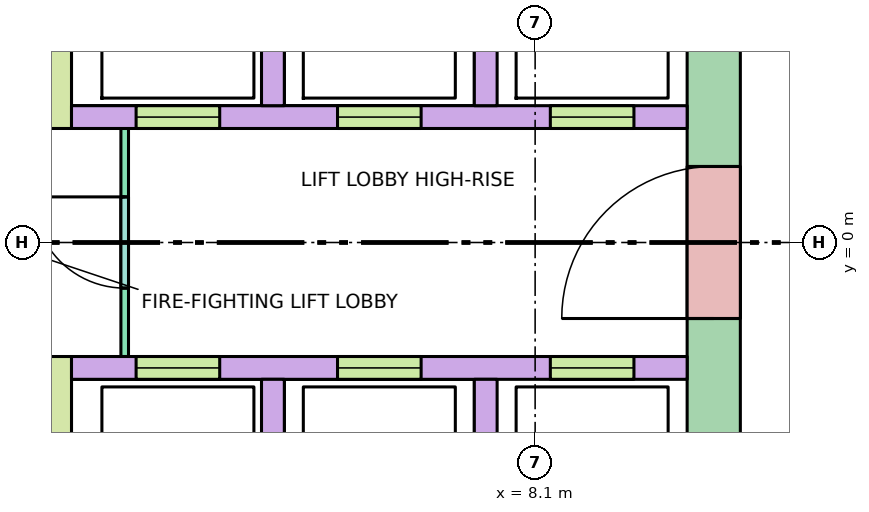
"""IFC4 building model, lengths in metres.
Left out: names, types, materials, properties, quantities, classifications, styles, units other than length and angle.
Written with IfcOpenShell. Run it as: python <this file> out.ifc"""

import sys

from ifc_helpers import new_model, si_unit, direction, frame, frame_2d, origin, place, context, subcontext, project, spatial, rectangle, extrude, element, fill, save


model = new_model("IFC4")
c1 = context("Model", 3, precision=1e-05, world=origin(), true_north=direction((0.0, 1.0)))
c2 = subcontext(c1, "Body", "Model", "MODEL_VIEW")
j1 = project(units=[si_unit("LENGTHUNIT", "METRE"), si_unit("PLANEANGLEUNIT", "RADIAN")], contexts=[c1])
p1 = place(None, origin())
s1 = spatial("IfcSite", under=j1, at=p1, CompositionType="ELEMENT")
p2 = place(p1, origin())
s2 = spatial("IfcBuilding", under=s1, at=p2, CompositionType="ELEMENT")
p3 = place(p2, frame((0.0, 0.0, 226.1)))
s3 = spatial("IfcBuildingStorey", under=s2, at=p3, CompositionType="ELEMENT", Elevation=226.1)
p4 = place(p3, frame((10.45, -5.13, -0.28), z_axis=(0.0, 0.0, 1.0), x_axis=(0.0, 1.0, 0.0)))
e1 = element("IfcWall", 1, at=p4, inside=s3, PredefinedType="SHEAR", context=c2, shape_type="SweptSolid", body=[
    extrude(rectangle(XDim=10.26, YDim=0.7, at=frame_2d((5.13, 0.0))), origin(), (0.0, 0.0, 1.0), 3.7),
])
p5 = place(p4, frame((4.13, 0.0, 0.28)))
e2 = element("IfcOpeningElement", 2, at=p5, cuts=e1, PredefinedType="OPENING", context=c2, shape_type="SweptSolid", body=[
    extrude(rectangle(XDim=2.0, YDim=2.1, at=frame_2d((1.0, 1.05))), frame((0.0, 0.36, 0.0), z_axis=(0.0, -1.0, 0.0), x_axis=(1.0, 0.0, 0.0)), (0.0, 0.0, 1.0), 0.72),
])
p6 = place(p3, frame((2.0, 1.65, 0.0), z_axis=(0.0, 0.0, 1.0), x_axis=(1.0, 0.0, 0.0)))
e3 = element("IfcWall", 3, at=p6, inside=s3, PredefinedType="SOLIDWALL", context=c2, shape_type="SweptSolid", body=[
    extrude(rectangle(XDim=8.1, YDim=0.3, at=frame_2d((4.05, 0.0))), origin(), (0.0, 0.0, 1.0), 3.42),
])
p7 = place(p6, frame((0.85, 0.0, 0.0)))
e4 = element("IfcOpeningElement", 4, at=p7, cuts=e3, PredefinedType="OPENING", context=c2, shape_type="SweptSolid", body=[
    extrude(rectangle(XDim=1.1, YDim=2.1, at=frame_2d((0.55, 1.05))), frame((0.0, 0.16, 0.0), z_axis=(0.0, -1.0, 0.0), x_axis=(1.0, 0.0, 0.0)), (0.0, 0.0, 1.0), 0.32),
])
p8 = place(p6, frame((3.5, 0.0, 0.0)))
e5 = element("IfcOpeningElement", 5, at=p8, cuts=e3, PredefinedType="OPENING", context=c2, shape_type="SweptSolid", body=[
    extrude(rectangle(XDim=1.1, YDim=2.1, at=frame_2d((0.55, 1.05))), frame((0.0, 0.16, 0.0), z_axis=(0.0, -1.0, 0.0), x_axis=(1.0, 0.0, 0.0)), (0.0, 0.0, 1.0), 0.32),
])
p9 = place(p6, frame((6.3, 0.0, 0.0)))
e6 = element("IfcOpeningElement", 6, at=p9, cuts=e3, PredefinedType="OPENING", context=c2, shape_type="SweptSolid", body=[
    extrude(rectangle(XDim=1.1, YDim=2.1, at=frame_2d((0.55, 1.05))), frame((0.0, 0.16, 0.0), z_axis=(0.0, -1.0, 0.0), x_axis=(1.0, 0.0, 0.0)), (0.0, 0.0, 1.0), 0.32),
])
p10 = place(p3, frame((2.0, -1.65, 0.0), z_axis=(0.0, 0.0, 1.0), x_axis=(1.0, 0.0, 0.0)))
e7 = element("IfcWall", 7, at=p10, inside=s3, PredefinedType="SOLIDWALL", context=c2, shape_type="SweptSolid", body=[
    extrude(rectangle(XDim=8.1, YDim=0.3, at=frame_2d((4.05, 0.0))), origin(), (0.0, 0.0, 1.0), 3.42),
])
p11 = place(p10, frame((0.85, 0.0, 0.0)))
e8 = element("IfcOpeningElement", 8, at=p11, cuts=e7, PredefinedType="OPENING", context=c2, shape_type="SweptSolid", body=[
    extrude(rectangle(XDim=1.1, YDim=2.1, at=frame_2d((0.55, 1.05))), frame((0.0, 0.16, 0.0), z_axis=(0.0, -1.0, 0.0), x_axis=(1.0, 0.0, 0.0)), (0.0, 0.0, 1.0), 0.32),
])
p12 = place(p10, frame((3.5, 0.0, 0.0)))
e9 = element("IfcOpeningElement", 9, at=p12, cuts=e7, PredefinedType="OPENING", context=c2, shape_type="SweptSolid", body=[
    extrude(rectangle(XDim=1.1, YDim=2.1, at=frame_2d((0.55, 1.05))), frame((0.0, 0.16, 0.0), z_axis=(0.0, -1.0, 0.0), x_axis=(1.0, 0.0, 0.0)), (0.0, 0.0, 1.0), 0.32),
])
p13 = place(p10, frame((6.3, 0.0, 0.0)))
e10 = element("IfcOpeningElement", 10, at=p13, cuts=e7, PredefinedType="OPENING", context=c2, shape_type="SweptSolid", body=[
    extrude(rectangle(XDim=1.1, YDim=2.1, at=frame_2d((0.55, 1.05))), frame((0.0, 0.16, 0.0), z_axis=(0.0, -1.0, 0.0), x_axis=(1.0, 0.0, 0.0)), (0.0, 0.0, 1.0), 0.32),
])
for number, where, z_axis, x_axis in (
    (11, (4.65, 1.8, 0.0), (0.0, 0.0, 1.0), (0.0, 1.0, 0.0)),
    (12, (4.65, -4.2, 0.0), (0.0, 0.0, 1.0), (0.0, 1.0, 0.0)),
    (13, (7.45, 1.8, 0.0), (0.0, 0.0, 1.0), (0.0, 1.0, 0.0)),
    (14, (7.45, -4.2, 0.0), (0.0, 0.0, 1.0), (0.0, 1.0, 0.0)),
):
    element("IfcWall", number, at=place(p3, frame(where, z_axis=z_axis, x_axis=x_axis)), inside=s3, PredefinedType="SOLIDWALL", context=c2, shape_type="SweptSolid", body=[
        extrude(rectangle(XDim=2.4, YDim=0.3, at=frame_2d((1.2, 0.0))), origin(), (0.0, 0.0, 1.0), 3.42),
    ])
for number, where, z_axis, x_axis in (
    (15, (1.85, 1.5, 0.0), (0.0, 0.0, 1.0), (0.0, 1.0, 0.0)),
    (16, (1.85, -8.1, 0.0), (0.0, 0.0, 1.0), (0.0, 1.0, 0.0)),
):
    element("IfcWall", number, at=place(p3, frame(where, z_axis=z_axis, x_axis=x_axis)), inside=s3, PredefinedType="SHEAR", context=c2, shape_type="SweptSolid", body=[
        extrude(rectangle(XDim=6.6, YDim=0.3, at=frame_2d((3.3, 0.0))), origin(), (0.0, 0.0, 1.0), 3.42),
    ])
p14 = place(p3, frame((2.7, -1.5, 0.0), z_axis=(0.0, 0.0, 1.0), x_axis=(0.0, 1.0, 0.0)))
e17 = element("IfcWall", 17, at=p14, inside=s3, PredefinedType="PARTITIONING", context=c2, shape_type="SweptSolid", body=[
    extrude(rectangle(XDim=3.0, YDim=0.1, at=frame_2d((1.5, 0.0))), origin(), (0.0, 0.0, 1.0), 3.42),
])
p15 = place(p14, frame((0.9, 0.0, 0.0)))
e18 = element("IfcOpeningElement", 18, at=p15, cuts=e17, PredefinedType="OPENING", context=c2, shape_type="SweptSolid", body=[
    extrude(rectangle(XDim=1.2, YDim=2.1, at=frame_2d((0.6, 1.05))), frame((0.0, 0.06, 0.0), z_axis=(0.0, -1.0, 0.0), x_axis=(1.0, 0.0, 0.0)), (0.0, 0.0, 1.0), 0.12),
])
p16 = place(p7, origin())
e19 = element("IfcDoor", 19, at=p16, inside=s3, OperationType="DOUBLE_DOOR_SLIDING", PredefinedType="DOOR", context=c2, shape_type="SweptSolid", body=[
    extrude(rectangle(XDim=1.1, YDim=2.1, at=frame_2d((0.55, 1.05))), frame((0.0, 0.025, 0.0), z_axis=(0.0, -1.0, 0.0), x_axis=(1.0, 0.0, 0.0)), (0.0, 0.0, 1.0), 0.05),
])
fill(e4, e19)
p17 = place(p8, origin())
e20 = element("IfcDoor", 20, at=p17, inside=s3, OperationType="DOUBLE_DOOR_SLIDING", PredefinedType="DOOR", context=c2, shape_type="SweptSolid", body=[
    extrude(rectangle(XDim=1.1, YDim=2.1, at=frame_2d((0.55, 1.05))), frame((0.0, 0.025, 0.0), z_axis=(0.0, -1.0, 0.0), x_axis=(1.0, 0.0, 0.0)), (0.0, 0.0, 1.0), 0.05),
])
fill(e5, e20)
p18 = place(p9, origin())
e21 = element("IfcDoor", 21, at=p18, inside=s3, OperationType="DOUBLE_DOOR_SLIDING", PredefinedType="DOOR", context=c2, shape_type="SweptSolid", body=[
    extrude(rectangle(XDim=1.1, YDim=2.1, at=frame_2d((0.55, 1.05))), frame((0.0, 0.025, 0.0), z_axis=(0.0, -1.0, 0.0), x_axis=(1.0, 0.0, 0.0)), (0.0, 0.0, 1.0), 0.05),
])
fill(e6, e21)
p19 = place(p11, origin())
e22 = element("IfcDoor", 22, at=p19, inside=s3, OperationType="DOUBLE_DOOR_SLIDING", PredefinedType="DOOR", context=c2, shape_type="SweptSolid", body=[
    extrude(rectangle(XDim=1.1, YDim=2.1, at=frame_2d((0.55, 1.05))), frame((0.0, 0.025, 0.0), z_axis=(0.0, -1.0, 0.0), x_axis=(1.0, 0.0, 0.0)), (0.0, 0.0, 1.0), 0.05),
])
fill(e8, e22)
p20 = place(p12, origin())
e23 = element("IfcDoor", 23, at=p20, inside=s3, OperationType="DOUBLE_DOOR_SLIDING", PredefinedType="DOOR", context=c2, shape_type="SweptSolid", body=[
    extrude(rectangle(XDim=1.1, YDim=2.1, at=frame_2d((0.55, 1.05))), frame((0.0, 0.025, 0.0), z_axis=(0.0, -1.0, 0.0), x_axis=(1.0, 0.0, 0.0)), (0.0, 0.0, 1.0), 0.05),
])
fill(e9, e23)
p21 = place(p13, origin())
e24 = element("IfcDoor", 24, at=p21, inside=s3, OperationType="DOUBLE_DOOR_SLIDING", PredefinedType="DOOR", context=c2, shape_type="SweptSolid", body=[
    extrude(rectangle(XDim=1.1, YDim=2.1, at=frame_2d((0.55, 1.05))), frame((0.0, 0.025, 0.0), z_axis=(0.0, -1.0, 0.0), x_axis=(1.0, 0.0, 0.0)), (0.0, 0.0, 1.0), 0.05),
])
fill(e10, e24)
p22 = place(p5, origin())
e25 = element("IfcDoor", 25, at=p22, inside=s3, OperationType="DOUBLE_DOOR_SINGLE_SWING", PredefinedType="DOOR", context=c2, shape_type="SweptSolid", body=[
    extrude(rectangle(XDim=2.0, YDim=2.1, at=frame_2d((1.0, 1.05))), frame((0.0, 0.025, 0.0), z_axis=(0.0, -1.0, 0.0), x_axis=(1.0, 0.0, 0.0)), (0.0, 0.0, 1.0), 0.05),
])
fill(e2, e25)
p23 = place(p15, origin())
e26 = element("IfcDoor", 26, at=p23, inside=s3, OperationType="SINGLE_SWING_RIGHT", PredefinedType="DOOR", context=c2, shape_type="SweptSolid", body=[
    extrude(rectangle(XDim=1.2, YDim=2.1, at=frame_2d((0.6, 1.05))), frame((0.0, 0.025, 0.0), z_axis=(0.0, -1.0, 0.0), x_axis=(1.0, 0.0, 0.0)), (0.0, 0.0, 1.0), 0.05),
])
fill(e18, e26)
save(model, sys.argv[1])
